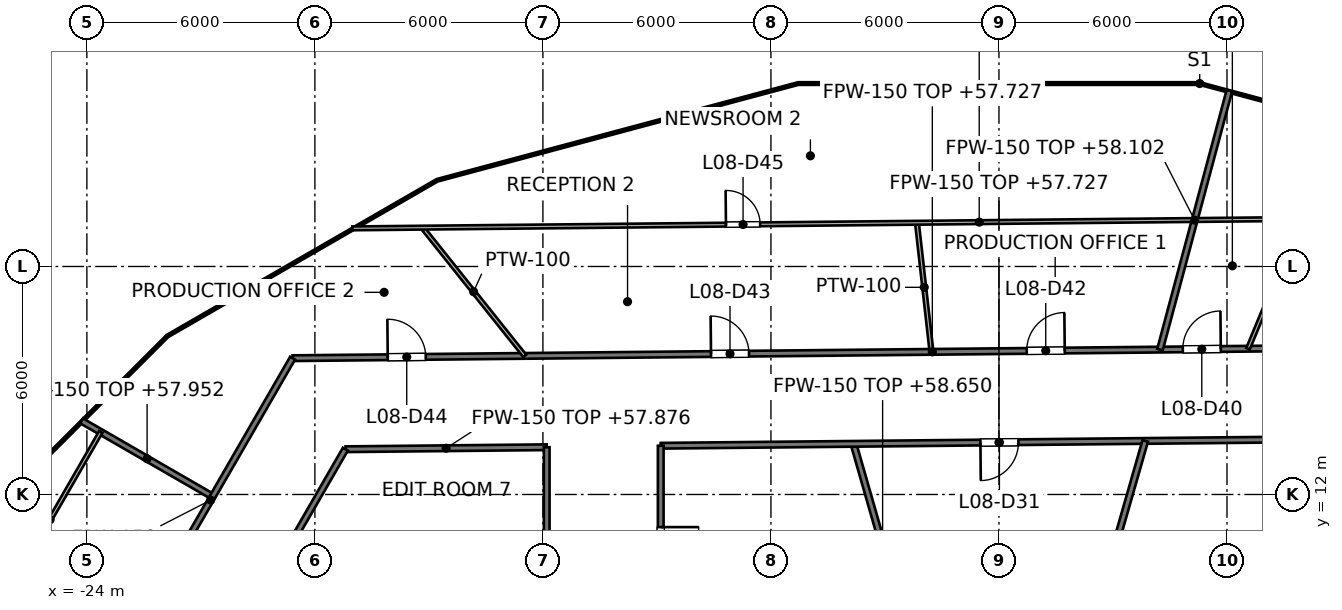
"""IFC4 building model, lengths in metres.
Left out: names, types, materials, properties, quantities, classifications, styles, units other than length and angle.
Written with IfcOpenShell. Run it as: python <this file> out.ifc"""

import sys

from ifc_helpers import new_model, si_unit, direction, frame, frame_2d, origin, place, context, subcontext, project, spatial, rectangle, extrude, element, fill, save


model = new_model("IFC4")
c1 = context("Model", 3, precision=1e-05, world=origin(), true_north=direction((0.0, 1.0)))
c2 = subcontext(c1, "Body", "Model", "MODEL_VIEW")
j1 = project(units=[si_unit("LENGTHUNIT", "METRE"), si_unit("PLANEANGLEUNIT", "RADIAN")], contexts=[c1])
p1 = place(None, origin())
s1 = spatial("IfcSite", under=j1, at=p1, CompositionType="ELEMENT")
p2 = place(p1, origin())
s2 = spatial("IfcBuilding", under=s1, at=p2, CompositionType="ELEMENT")
p3 = place(p2, frame((0.0, 0.0, 54.6)))
s3 = spatial("IfcBuildingStorey", under=s2, at=p3, CompositionType="ELEMENT", Elevation=54.6)
p4 = place(p3, frame((-3.827, 13.333, 0.0), z_axis=(0.0, 0.0, 1.0), x_axis=(0.275935525478, -0.961176147113, 0.0)))
e1 = element("IfcWall", 1, at=p4, inside=s3, PredefinedType="PARTITIONING", context=c2, shape_type="SweptSolid", body=[
    extrude(rectangle(XDim=5.548, YDim=0.15, at=frame_2d((2.774, 0.0))), origin(), (0.0, 0.0, 1.0), 4.05),
])
p5 = place(p3, frame((-24.141, 13.938, 0.0), z_axis=(0.0, 0.0, 1.0), x_axis=(0.865983578848, -0.500072435918, 0.0)))
e2 = element("IfcWall", 2, at=p5, inside=s3, PredefinedType="PARTITIONING", context=c2, shape_type="SweptSolid", body=[
    extrude(rectangle(XDim=3.985, YDim=0.15, at=frame_2d((1.993, 0.0))), origin(), (0.0, 0.0, 1.0), 3.352),
])
p6 = place(p3, frame((-17.194, 13.191, 0.0), z_axis=(0.0, 0.0, 1.0), x_axis=(0.999950853109, 0.009914200296, 0.0)))
e3 = element("IfcWall", 3, at=p6, inside=s3, PredefinedType="PARTITIONING", context=c2, shape_type="SweptSolid", body=[
    extrude(rectangle(XDim=5.294, YDim=0.15, at=frame_2d((2.647, 0.0))), origin(), (0.0, 0.0, 1.0), 3.276),
])
p7 = place(p3, frame((-8.9, 13.282, 0.0), z_axis=(0.0, 0.0, 1.0), x_axis=(0.999950834077, 0.009916119672, 0.0)))
e4 = element("IfcWall", 4, at=p7, inside=s3, PredefinedType="PARTITIONING", context=c2, shape_type="SweptSolid", body=[
    extrude(rectangle(XDim=17.801, YDim=0.15, at=frame_2d((8.9, 0.0))), origin(), (0.0, 0.0, 1.0), 3.127),
])
p8 = place(p7, frame((8.412, 0.0, 0.0)))
e5 = element("IfcOpeningElement", 5, at=p8, cuts=e4, PredefinedType="OPENING", context=c2, shape_type="SweptSolid", body=[
    extrude(rectangle(XDim=1.0, YDim=2.1, at=frame_2d((0.5, 1.05))), frame((0.0, 0.075, 0.0), z_axis=(0.0, -1.0, 0.0), x_axis=(1.0, 0.0, 0.0)), (0.0, 0.0, 1.0), 0.15),
])
p9 = place(p3, frame((-18.587, 15.586, 0.0), z_axis=(0.0, 0.0, 1.0), x_axis=(0.99995087003, 0.009912493396, 0.0)))
e6 = element("IfcWall", 6, at=p9, inside=s3, PredefinedType="PARTITIONING", context=c2, shape_type="SweptSolid", body=[
    extrude(rectangle(XDim=33.669, YDim=0.15, at=frame_2d((16.834, 0.0))), origin(), (0.0, 0.0, 1.0), 3.127),
])
p10 = place(p9, frame((26.281, 0.0, 0.0)))
e7 = element("IfcOpeningElement", 7, at=p10, cuts=e6, PredefinedType="OPENING", context=c2, shape_type="SweptSolid", body=[
    extrude(rectangle(XDim=1.0, YDim=2.1, at=frame_2d((0.5, 1.05))), frame((0.0, 0.075, 0.0), z_axis=(0.0, -1.0, 0.0), x_axis=(1.0, 0.0, 0.0)), (0.0, 0.0, 1.0), 0.15),
])
p11 = place(p9, frame((23.425, 0.0, 0.0)))
e8 = element("IfcOpeningElement", 8, at=p11, cuts=e6, PredefinedType="OPENING", context=c2, shape_type="SweptSolid", body=[
    extrude(rectangle(XDim=1.0, YDim=2.1, at=frame_2d((0.5, 1.05))), frame((0.0, 0.075, 0.0), z_axis=(0.0, -1.0, 0.0), x_axis=(1.0, 0.0, 0.0)), (0.0, 0.0, 1.0), 0.15),
])
p12 = place(p9, frame((19.319, 0.0, 0.0)))
e9 = element("IfcOpeningElement", 9, at=p12, cuts=e6, PredefinedType="OPENING", context=c2, shape_type="SweptSolid", body=[
    extrude(rectangle(XDim=1.0, YDim=2.1, at=frame_2d((0.5, 1.05))), frame((0.0, 0.075, 0.0), z_axis=(0.0, -1.0, 0.0), x_axis=(1.0, 0.0, 0.0)), (0.0, 0.0, 1.0), 0.15),
])
p13 = place(p9, frame((11.01, 0.0, 0.0)))
e10 = element("IfcOpeningElement", 10, at=p13, cuts=e6, PredefinedType="OPENING", context=c2, shape_type="SweptSolid", body=[
    extrude(rectangle(XDim=1.0, YDim=2.1, at=frame_2d((0.5, 1.05))), frame((0.0, 0.075, 0.0), z_axis=(0.0, -1.0, 0.0), x_axis=(1.0, 0.0, 0.0)), (0.0, 0.0, 1.0), 0.15),
])
p14 = place(p9, frame((2.504, 0.0, 0.0)))
e11 = element("IfcOpeningElement", 11, at=p14, cuts=e6, PredefinedType="OPENING", context=c2, shape_type="SweptSolid", body=[
    extrude(rectangle(XDim=1.0, YDim=2.1, at=frame_2d((0.5, 1.05))), frame((0.0, 0.075, 0.0), z_axis=(0.0, -1.0, 0.0), x_axis=(1.0, 0.0, 0.0)), (0.0, 0.0, 1.0), 0.15),
])
p15 = place(p3, frame((-20.5, 7.474, 0.0), z_axis=(0.0, 0.0, 1.0), x_axis=(0.500012665616, 0.866018091164, 0.0)))
e12 = element("IfcWall", 12, at=p15, inside=s3, PredefinedType="PARTITIONING", context=c2, shape_type="SweptSolid", body=[
    extrude(rectangle(XDim=6.602, YDim=0.15, at=frame_2d((3.301, 0.0))), origin(), (0.0, 0.0, 1.0), 3.195),
])
p16 = place(p15, frame((2.803, 0.0, 0.0)))
e13 = element("IfcOpeningElement", 13, at=p16, cuts=e12, PredefinedType="OPENING", context=c2, shape_type="SweptSolid", body=[
    extrude(rectangle(XDim=1.0, YDim=2.1, at=frame_2d((0.5, 1.05))), frame((0.0, 0.075, 0.0), z_axis=(0.0, -1.0, 0.0), x_axis=(1.0, 0.0, 0.0)), (0.0, 0.0, 1.0), 0.15),
])
p17 = place(p3, frame((-22.9, 8.117, 0.0), z_axis=(0.0, 0.0, 1.0), x_axis=(0.5000050195, 0.866022505755, 0.0)))
e14 = element("IfcWall", 14, at=p17, inside=s3, PredefinedType="PARTITIONING", context=c2, shape_type="SweptSolid", body=[
    extrude(rectangle(XDim=8.626, YDim=0.15, at=frame_2d((4.313, 0.0))), origin(), (0.0, 0.0, 1.0), 3.195),
])
p18 = place(p3, frame((2.296, 8.0, 0.0), z_axis=(0.0, 0.0, 1.0), x_axis=(0.275958345059, 0.961169595749, 0.0)))
e15 = element("IfcWall", 15, at=p18, inside=s3, PredefinedType="PARTITIONING", context=c2, shape_type="SweptSolid", body=[
    extrude(rectangle(XDim=5.628, YDim=0.15, at=frame_2d((2.814, 0.0))), origin(), (0.0, 0.0, 1.0), 4.05),
])
p19 = place(p3, frame((4.237, 15.813, 0.0), z_axis=(0.0, 0.0, 1.0), x_axis=(0.258871033447, 0.965911894555, 0.0)))
e16 = element("IfcWall", 16, at=p19, inside=s3, PredefinedType="PARTITIONING", context=c2, shape_type="SweptSolid", body=[
    extrude(rectangle(XDim=7.053, YDim=0.15, at=frame_2d((3.527, 0.0))), origin(), (0.0, 0.0, 1.0), 3.501),
])
p20 = place(p3, frame((-8.9, 8.0, 0.0), z_axis=(0.0, 0.0, 1.0), x_axis=(0.0, 1.0, 0.0)))
e17 = element("IfcWall", 17, at=p20, inside=s3, PredefinedType="PARTITIONING", context=c2, shape_type="SweptSolid", body=[
    extrude(rectangle(XDim=5.283, YDim=0.15, at=frame_2d((2.642, 0.0))), origin(), (0.0, 0.0, 1.0), 3.127),
])
p21 = place(p20, frame((2.142, 0.0, 0.0)))
e18 = element("IfcOpeningElement", 18, at=p21, cuts=e17, PredefinedType="OPENING", context=c2, shape_type="SweptSolid", body=[
    extrude(rectangle(XDim=1.0, YDim=2.1, at=frame_2d((0.5, 1.05))), frame((0.0, 0.075, 0.0), z_axis=(0.0, -1.0, 0.0), x_axis=(1.0, 0.0, 0.0)), (0.0, 0.0, 1.0), 0.15),
])
p22 = place(p3, frame((-11.9, 8.0, 0.0), z_axis=(0.0, 0.0, 1.0), x_axis=(0.0, 1.0, 0.0)))
e19 = element("IfcWall", 19, at=p22, inside=s3, PredefinedType="PARTITIONING", context=c2, shape_type="SweptSolid", body=[
    extrude(rectangle(XDim=5.243, YDim=0.15, at=frame_2d((2.622, 0.0))), origin(), (0.0, 0.0, 1.0), 3.195),
])
p23 = place(p3, frame((-2.158, 19.15, 0.0), z_axis=(0.0, 0.0, 1.0), x_axis=(0.112085765887, -0.993698536321, 0.0)))
e20 = element("IfcWall", 20, at=p23, inside=s3, PredefinedType="PARTITIONING", context=c2, shape_type="SweptSolid", body=[
    extrude(rectangle(XDim=3.417, YDim=0.1, at=frame_2d((1.709, 0.0))), origin(), (0.0, 0.0, 1.0), 4.05),
])
p24 = place(p3, frame((-15.169, 19.021, 0.0), z_axis=(0.0, 0.0, 1.0), x_axis=(0.623493525826, -0.781828512689, 0.0)))
e21 = element("IfcWall", 21, at=p24, inside=s3, PredefinedType="PARTITIONING", context=c2, shape_type="SweptSolid", body=[
    extrude(rectangle(XDim=4.314, YDim=0.1, at=frame_2d((2.157, 0.0))), origin(), (0.0, 0.0, 1.0), 4.05),
])
p25 = place(p3, frame((-17.014, 19.003, 0.0), z_axis=(0.0, 0.0, 1.0), x_axis=(0.99995097792, 0.009901603787, 0.0)))
e22 = element("IfcWall", 22, at=p25, inside=s3, PredefinedType="PARTITIONING", context=c2, shape_type="SweptSolid", body=[
    extrude(rectangle(XDim=32.991, YDim=0.1, at=frame_2d((16.495, 0.0))), origin(), (0.0, 0.0, 1.0), 3.127),
])
p26 = place(p25, frame((29.148, 0.0, 0.0)))
e23 = element("IfcOpeningElement", 23, at=p26, cuts=e22, PredefinedType="OPENING", context=c2, shape_type="SweptSolid", body=[
    extrude(rectangle(XDim=0.9, YDim=2.1, at=frame_2d((0.45, 1.05))), frame((0.0, 0.05, 0.0), z_axis=(0.0, -1.0, 0.0), x_axis=(1.0, 0.0, 0.0)), (0.0, 0.0, 1.0), 0.1),
])
p27 = place(p25, frame((9.831, 0.0, 0.0)))
e24 = element("IfcOpeningElement", 24, at=p27, cuts=e22, PredefinedType="OPENING", context=c2, shape_type="SweptSolid", body=[
    extrude(rectangle(XDim=0.9, YDim=2.1, at=frame_2d((0.45, 1.05))), frame((0.0, 0.05, 0.0), z_axis=(0.0, -1.0, 0.0), x_axis=(1.0, 0.0, 0.0)), (0.0, 0.0, 1.0), 0.1),
])
p28 = place(p3, frame((-26.3, 9.028, 0.0), z_axis=(0.0, 0.0, 1.0), x_axis=(0.500059382915, 0.865991116328, 0.0)))
e25 = element("IfcWall", 25, at=p28, inside=s3, PredefinedType="PARTITIONING", context=c2, shape_type="SweptSolid", body=[
    extrude(rectangle(XDim=5.331, YDim=0.1, at=frame_2d((2.666, 0.0))), origin(), (0.0, 0.0, 1.0), 3.276),
])
p29 = place(p3, frame((6.554, 15.836, 0.0), z_axis=(0.0, 0.0, 1.0), x_axis=(0.382344013287, 0.924020051462, 0.0)))
e26 = element("IfcWall", 26, at=p29, inside=s3, PredefinedType="PARTITIONING", context=c2, shape_type="SweptSolid", body=[
    extrude(rectangle(XDim=3.696, YDim=0.1, at=frame_2d((1.848, 0.0))), origin(), (0.0, 0.0, 1.0), 4.05),
])
p30 = place(p8, origin())
e27 = element("IfcDoor", 27, at=p30, inside=s3, OperationType="SINGLE_SWING_LEFT", PredefinedType="DOOR", context=c2, shape_type="SweptSolid", body=[
    extrude(rectangle(XDim=1.0, YDim=2.1, at=frame_2d((0.5, 1.05))), frame((0.0, 0.025, 0.0), z_axis=(0.0, -1.0, 0.0), x_axis=(1.0, 0.0, 0.0)), (0.0, 0.0, 1.0), 0.05),
])
fill(e5, e27)
p31 = place(p21, origin())
e28 = element("IfcDoor", 28, at=p31, inside=s3, OperationType="SINGLE_SWING_RIGHT", PredefinedType="DOOR", context=c2, shape_type="SweptSolid", body=[
    extrude(rectangle(XDim=1.0, YDim=2.1, at=frame_2d((0.5, 1.05))), frame((0.0, 0.025, 0.0), z_axis=(0.0, -1.0, 0.0), x_axis=(1.0, 0.0, 0.0)), (0.0, 0.0, 1.0), 0.05),
])
fill(e18, e28)
p32 = place(p11, origin())
e29 = element("IfcDoor", 29, at=p32, inside=s3, OperationType="SINGLE_SWING_RIGHT", PredefinedType="DOOR", context=c2, shape_type="SweptSolid", body=[
    extrude(rectangle(XDim=1.0, YDim=2.1, at=frame_2d((0.5, 1.05))), frame((0.0, 0.025, 0.0), z_axis=(0.0, -1.0, 0.0), x_axis=(1.0, 0.0, 0.0)), (0.0, 0.0, 1.0), 0.05),
])
fill(e8, e29)
p33 = place(p12, origin())
e30 = element("IfcDoor", 30, at=p33, inside=s3, OperationType="SINGLE_SWING_RIGHT", PredefinedType="DOOR", context=c2, shape_type="SweptSolid", body=[
    extrude(rectangle(XDim=1.0, YDim=2.1, at=frame_2d((0.5, 1.05))), frame((0.0, 0.025, 0.0), z_axis=(0.0, -1.0, 0.0), x_axis=(1.0, 0.0, 0.0)), (0.0, 0.0, 1.0), 0.05),
])
fill(e9, e30)
p34 = place(p13, origin())
e31 = element("IfcDoor", 31, at=p34, inside=s3, OperationType="SINGLE_SWING_LEFT", PredefinedType="DOOR", context=c2, shape_type="SweptSolid", body=[
    extrude(rectangle(XDim=1.0, YDim=2.1, at=frame_2d((0.5, 1.05))), frame((0.0, 0.025, 0.0), z_axis=(0.0, -1.0, 0.0), x_axis=(1.0, 0.0, 0.0)), (0.0, 0.0, 1.0), 0.05),
])
fill(e10, e31)
p35 = place(p14, origin())
e32 = element("IfcDoor", 32, at=p35, inside=s3, OperationType="SINGLE_SWING_LEFT", PredefinedType="DOOR", context=c2, shape_type="SweptSolid", body=[
    extrude(rectangle(XDim=1.0, YDim=2.1, at=frame_2d((0.5, 1.05))), frame((0.0, 0.025, 0.0), z_axis=(0.0, -1.0, 0.0), x_axis=(1.0, 0.0, 0.0)), (0.0, 0.0, 1.0), 0.05),
])
fill(e11, e32)
p36 = place(p27, origin())
e33 = element("IfcDoor", 33, at=p36, inside=s3, OperationType="SINGLE_SWING_LEFT", PredefinedType="DOOR", context=c2, shape_type="SweptSolid", body=[
    extrude(rectangle(XDim=0.9, YDim=2.1, at=frame_2d((0.45, 1.05))), frame((0.0, 0.025, 0.0), z_axis=(0.0, -1.0, 0.0), x_axis=(1.0, 0.0, 0.0)), (0.0, 0.0, 1.0), 0.05),
])
fill(e24, e33)
save(model, sys.argv[1])
